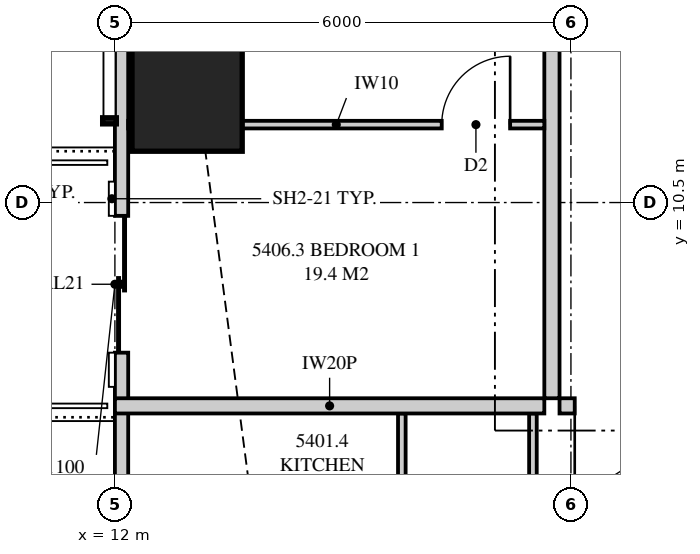
"""IFC4 building model, lengths in metres.
Left out: names, types, materials, properties, quantities, classifications, styles, units other than length and angle.
Written with IfcOpenShell. Run it as: python <this file> out.ifc"""

import sys

from ifc_helpers import new_model, si_unit, direction, frame, frame_2d, origin, origin_2d, place, context, subcontext, project, spatial, polyline, rectangle, outline, extrude, element, fill, save


model = new_model("IFC4")
c1 = context("Model", 3, precision=1e-05, world=origin(), true_north=direction((0.0, 1.0)))
c2 = subcontext(c1, "Body", "Model", "MODEL_VIEW")
j1 = project(units=[si_unit("LENGTHUNIT", "METRE"), si_unit("PLANEANGLEUNIT", "RADIAN")], contexts=[c1])
p1 = place(None, origin())
s1 = spatial("IfcSite", under=j1, at=p1, CompositionType="ELEMENT")
p2 = place(p1, origin())
s2 = spatial("IfcBuilding", under=s1, at=p2, CompositionType="ELEMENT")
p3 = place(p2, frame((0.0, 0.0, 197.9)))
s3 = spatial("IfcBuildingStorey", under=s2, at=p3, CompositionType="ELEMENT", Elevation=197.9)
p4 = place(p3, frame((12.95, 13.0, 0.0), z_axis=(0.0, 0.0, 1.0), x_axis=(1.0, 0.0, 0.0)))
e1 = element("IfcColumn", 1, at=p4, inside=s3, PredefinedType="COLUMN", context=c2, shape_type="SweptSolid", body=[
    extrude(rectangle(XDim=1.45, YDim=3.65, at=origin_2d()), origin(), (0.0, 0.0, 1.0), 3.35),
])
p5 = place(p3, frame((12.087, 32.949, 0.0), z_axis=(0.0, 0.0, 1.0), x_axis=(0.0, -1.0, 0.0)))
e2 = element("IfcWall", 2, at=p5, inside=s3, PredefinedType="SOLIDWALL", context=c2, shape_type="SweptSolid", body=[
    extrude(outline(polyline([(0.0, 0.0), (29.897, 0.0), (29.897, 3.11), (20.191, 3.11), (20.191, 2.15), (20.051, 2.15), (20.051, 3.11), (19.949, 3.11), (19.949, 2.15), (7.949, 2.15), (7.949, 3.11), (7.823, 3.11), (7.823, 2.15), (7.73, 2.15), (7.73, 3.11), (0.0, 3.11), (0.0, 0.0)])), frame((0.0, 0.087, 0.0), z_axis=(0.0, -1.0, 0.0), x_axis=(1.0, 0.0, 0.0)), (0.0, 0.0, 1.0), 0.175),
])
p6 = place(p5, frame((1.226, 0.0, 0.4)))
e3 = element("IfcOpeningElement", 3, at=p6, cuts=e2, PredefinedType="OPENING", context=c2, shape_type="SweptSolid", body=[
    extrude(rectangle(XDim=1.8, YDim=1.7, at=frame_2d((0.9, 0.85))), frame((0.0, 0.097, 0.0), z_axis=(0.0, -1.0, 0.0), x_axis=(1.0, 0.0, 0.0)), (0.0, 0.0, 1.0), 0.195),
])
p7 = place(p5, frame((9.899, 0.0, 0.4)))
e4 = element("IfcOpeningElement", 4, at=p7, cuts=e2, PredefinedType="OPENING", context=c2, shape_type="SweptSolid", body=[
    extrude(rectangle(XDim=1.8, YDim=1.7, at=frame_2d((0.9, 0.85))), frame((0.0, 0.097, 0.0), z_axis=(0.0, -1.0, 0.0), x_axis=(1.0, 0.0, 0.0)), (0.0, 0.0, 1.0), 0.195),
])
p8 = place(p5, frame((13.024, 0.0, 0.4)))
e5 = element("IfcOpeningElement", 5, at=p8, cuts=e2, PredefinedType="OPENING", context=c2, shape_type="SweptSolid", body=[
    extrude(rectangle(XDim=1.8, YDim=1.7, at=frame_2d((0.9, 0.85))), frame((0.0, 0.097, 0.0), z_axis=(0.0, -1.0, 0.0), x_axis=(1.0, 0.0, 0.0)), (0.0, 0.0, 1.0), 0.195),
])
p9 = place(p5, frame((16.201, 0.0, 0.4)))
e6 = element("IfcOpeningElement", 6, at=p9, cuts=e2, PredefinedType="OPENING", context=c2, shape_type="SweptSolid", body=[
    extrude(rectangle(XDim=1.8, YDim=1.7, at=frame_2d((0.9, 0.85))), frame((0.0, 0.097, 0.0), z_axis=(0.0, -1.0, 0.0), x_axis=(1.0, 0.0, 0.0)), (0.0, 0.0, 1.0), 0.195),
])
p10 = place(p5, frame((22.624, 0.0, 0.0)))
e7 = element("IfcOpeningElement", 7, at=p10, cuts=e2, PredefinedType="OPENING", context=c2, shape_type="SweptSolid", body=[
    extrude(rectangle(XDim=1.8, YDim=2.1, at=frame_2d((0.9, 1.05))), frame((0.0, 0.097, 0.0), z_axis=(0.0, -1.0, 0.0), x_axis=(1.0, 0.0, 0.0)), (0.0, 0.0, 1.0), 0.195),
])
p11 = place(p5, frame((26.099, 0.0, 0.4)))
e8 = element("IfcOpeningElement", 8, at=p11, cuts=e2, PredefinedType="OPENING", context=c2, shape_type="SweptSolid", body=[
    extrude(rectangle(XDim=1.2, YDim=1.7, at=frame_2d((0.6, 0.85))), frame((0.0, 0.097, 0.0), z_axis=(0.0, -1.0, 0.0), x_axis=(1.0, 0.0, 0.0)), (0.0, 0.0, 1.0), 0.195),
])
p12 = place(p3, frame((17.85, 7.825, 0.0), z_axis=(0.0, 0.0, 1.0), x_axis=(1.0, 0.0, 0.0)))
e9 = element("IfcWall", 9, at=p12, inside=s3, PredefinedType="PARTITIONING", context=c2, shape_type="SweptSolid", body=[
    extrude(rectangle(XDim=3.15, YDim=0.2, at=frame_2d((1.575, 0.0))), origin(), (0.0, 0.0, 1.0), 3.11),
])
p13 = place(p12, frame((0.2, 0.0, 0.0)))
e10 = element("IfcOpeningElement", 10, at=p13, cuts=e9, PredefinedType="OPENING", context=c2, shape_type="SweptSolid", body=[
    extrude(rectangle(XDim=1.05, YDim=2.2, at=frame_2d((0.525, 1.1))), frame((0.0, 0.11, 0.0), z_axis=(0.0, -1.0, 0.0), x_axis=(1.0, 0.0, 0.0)), (0.0, 0.0, 1.0), 0.22),
])
p14 = place(p3, frame((17.5, 0.175, 0.0), z_axis=(0.0, 0.0, 1.0), x_axis=(0.0, 1.0, 0.0)))
e11 = element("IfcWall", 11, at=p14, inside=s3, PredefinedType="PARTITIONING", context=c2, shape_type="SweptSolid", body=[
    extrude(outline(polyline([(0.0, 0.0), (7.55, 0.0), (7.55, 3.11), (2.489, 3.11), (2.489, 2.15), (0.742, 2.15), (0.742, 3.11), (0.0, 3.11), (0.0, 0.0)])), frame((0.0, 0.05, 0.0), z_axis=(0.0, -1.0, 0.0), x_axis=(1.0, 0.0, 0.0)), (0.0, 0.0, 1.0), 0.1),
])
p15 = place(p14, frame((3.7, 0.0, 0.0)))
e12 = element("IfcOpeningElement", 12, at=p15, cuts=e11, PredefinedType="OPENING", context=c2, shape_type="SweptSolid", body=[
    extrude(rectangle(XDim=0.9, YDim=2.1, at=frame_2d((0.45, 1.05))), frame((0.0, 0.06, 0.0), z_axis=(0.0, -1.0, 0.0), x_axis=(1.0, 0.0, 0.0)), (0.0, 0.0, 1.0), 0.12),
])
p16 = place(p3, frame((15.775, 4.775, 0.0), z_axis=(0.0, 0.0, 1.0), x_axis=(0.0, 1.0, 0.0)))
e13 = element("IfcWall", 13, at=p16, inside=s3, PredefinedType="PARTITIONING", context=c2, shape_type="SweptSolid", body=[
    extrude(rectangle(XDim=2.95, YDim=0.1, at=frame_2d((1.475, 0.0))), origin(), (0.0, 0.0, 1.0), 3.11),
])
p17 = place(p3, frame((12.0, 7.825, 0.0), z_axis=(0.0, 0.0, 1.0), x_axis=(1.0, 0.0, 0.0)))
e14 = element("IfcWall", 14, at=p17, inside=s3, PredefinedType="PARTITIONING", context=c2, shape_type="SweptSolid", body=[
    extrude(outline(polyline([(0.0, 0.0), (5.65, 0.0), (5.65, 3.11), (2.547, 3.11), (2.547, 2.15), (0.712, 2.15), (0.712, 3.11), (0.0, 3.11), (0.0, 0.0)])), frame((0.0, 0.1, 0.0), z_axis=(0.0, -1.0, 0.0), x_axis=(1.0, 0.0, 0.0)), (0.0, 0.0, 1.0), 0.2),
])
p18 = place(p3, frame((17.75, 7.925, 0.0), z_axis=(0.0, 0.0, 1.0), x_axis=(0.0, 1.0, 0.0)))
e15 = element("IfcWall", 15, at=p18, inside=s3, PredefinedType="PARTITIONING", context=c2, shape_type="SweptSolid", body=[
    extrude(outline(polyline([(0.0, 0.0), (21.15, 0.0), (21.15, 3.11), (17.412, 3.11), (17.412, 2.541), (16.738, 2.541), (16.738, 3.11), (5.412, 3.11), (5.412, 2.541), (4.738, 2.541), (4.738, 3.11), (0.0, 3.11), (0.0, 0.0)])), frame((0.0, 0.1, 0.0), z_axis=(0.0, -1.0, 0.0), x_axis=(1.0, 0.0, 0.0)), (0.0, 0.0, 1.0), 0.2),
])
p19 = place(p18, frame((16.25, 0.0, 0.0)))
e16 = element("IfcOpeningElement", 16, at=p19, cuts=e15, PredefinedType="OPENING", context=c2, shape_type="SweptSolid", body=[
    extrude(rectangle(XDim=1.05, YDim=2.2, at=frame_2d((0.525, 1.1))), frame((0.0, 0.11, 0.0), z_axis=(0.0, -1.0, 0.0), x_axis=(1.0, 0.0, 0.0)), (0.0, 0.0, 1.0), 0.22),
])
p20 = place(p3, frame((12.175, 11.525, 0.0), z_axis=(0.0, 0.0, 1.0), x_axis=(1.0, 0.0, 0.0)))
e17 = element("IfcWall", 17, at=p20, inside=s3, PredefinedType="PARTITIONING", context=c2, shape_type="SweptSolid", body=[
    extrude(outline(polyline([(0.0, 0.0), (5.475, 0.0), (5.475, 3.11), (1.836, 3.11), (1.836, 2.15), (0.101, 2.15), (0.101, 3.11), (0.0, 3.11), (0.0, 0.0)])), frame((0.0, 0.05, 0.0), z_axis=(0.0, -1.0, 0.0), x_axis=(1.0, 0.0, 0.0)), (0.0, 0.0, 1.0), 0.1),
])
p21 = place(p20, frame((4.125, 0.0, 0.0)))
e18 = element("IfcOpeningElement", 18, at=p21, cuts=e17, PredefinedType="OPENING", context=c2, shape_type="SweptSolid", body=[
    extrude(rectangle(XDim=0.9, YDim=2.1, at=frame_2d((0.45, 1.05))), frame((0.0, 0.06, 0.0), z_axis=(0.0, -1.0, 0.0), x_axis=(1.0, 0.0, 0.0)), (0.0, 0.0, 1.0), 0.12),
])
p22 = place(p10, origin())
e19 = element("IfcDoor", 19, at=p22, inside=s3, OperationType="SLIDING_TO_LEFT", PredefinedType="DOOR", context=c2, shape_type="SweptSolid", body=[
    extrude(rectangle(XDim=1.8, YDim=2.1, at=frame_2d((0.9, 1.05))), frame((0.0, 0.025, 0.0), z_axis=(0.0, -1.0, 0.0), x_axis=(1.0, 0.0, 0.0)), (0.0, 0.0, 1.0), 0.05),
])
fill(e7, e19)
p23 = place(p13, frame((1.05, 0.0, 0.0), z_axis=(0.0, 0.0, 1.0), x_axis=(-1.0, 0.0, 0.0)))
e20 = element("IfcDoor", 20, at=p23, inside=s3, OperationType="SINGLE_SWING_RIGHT", PredefinedType="DOOR", context=c2, shape_type="SweptSolid", body=[
    extrude(rectangle(XDim=1.05, YDim=2.2, at=frame_2d((0.525, 1.1))), frame((0.0, 0.025, 0.0), z_axis=(0.0, -1.0, 0.0), x_axis=(1.0, 0.0, 0.0)), (0.0, 0.0, 1.0), 0.05),
])
fill(e10, e20)
p24 = place(p21, origin())
e21 = element("IfcDoor", 21, at=p24, inside=s3, OperationType="SINGLE_SWING_RIGHT", PredefinedType="DOOR", context=c2, shape_type="SweptSolid", body=[
    extrude(rectangle(XDim=0.9, YDim=2.1, at=frame_2d((0.45, 1.05))), frame((0.0, 0.025, 0.0), z_axis=(0.0, -1.0, 0.0), x_axis=(1.0, 0.0, 0.0)), (0.0, 0.0, 1.0), 0.05),
])
fill(e18, e21)
save(model, sys.argv[1])
